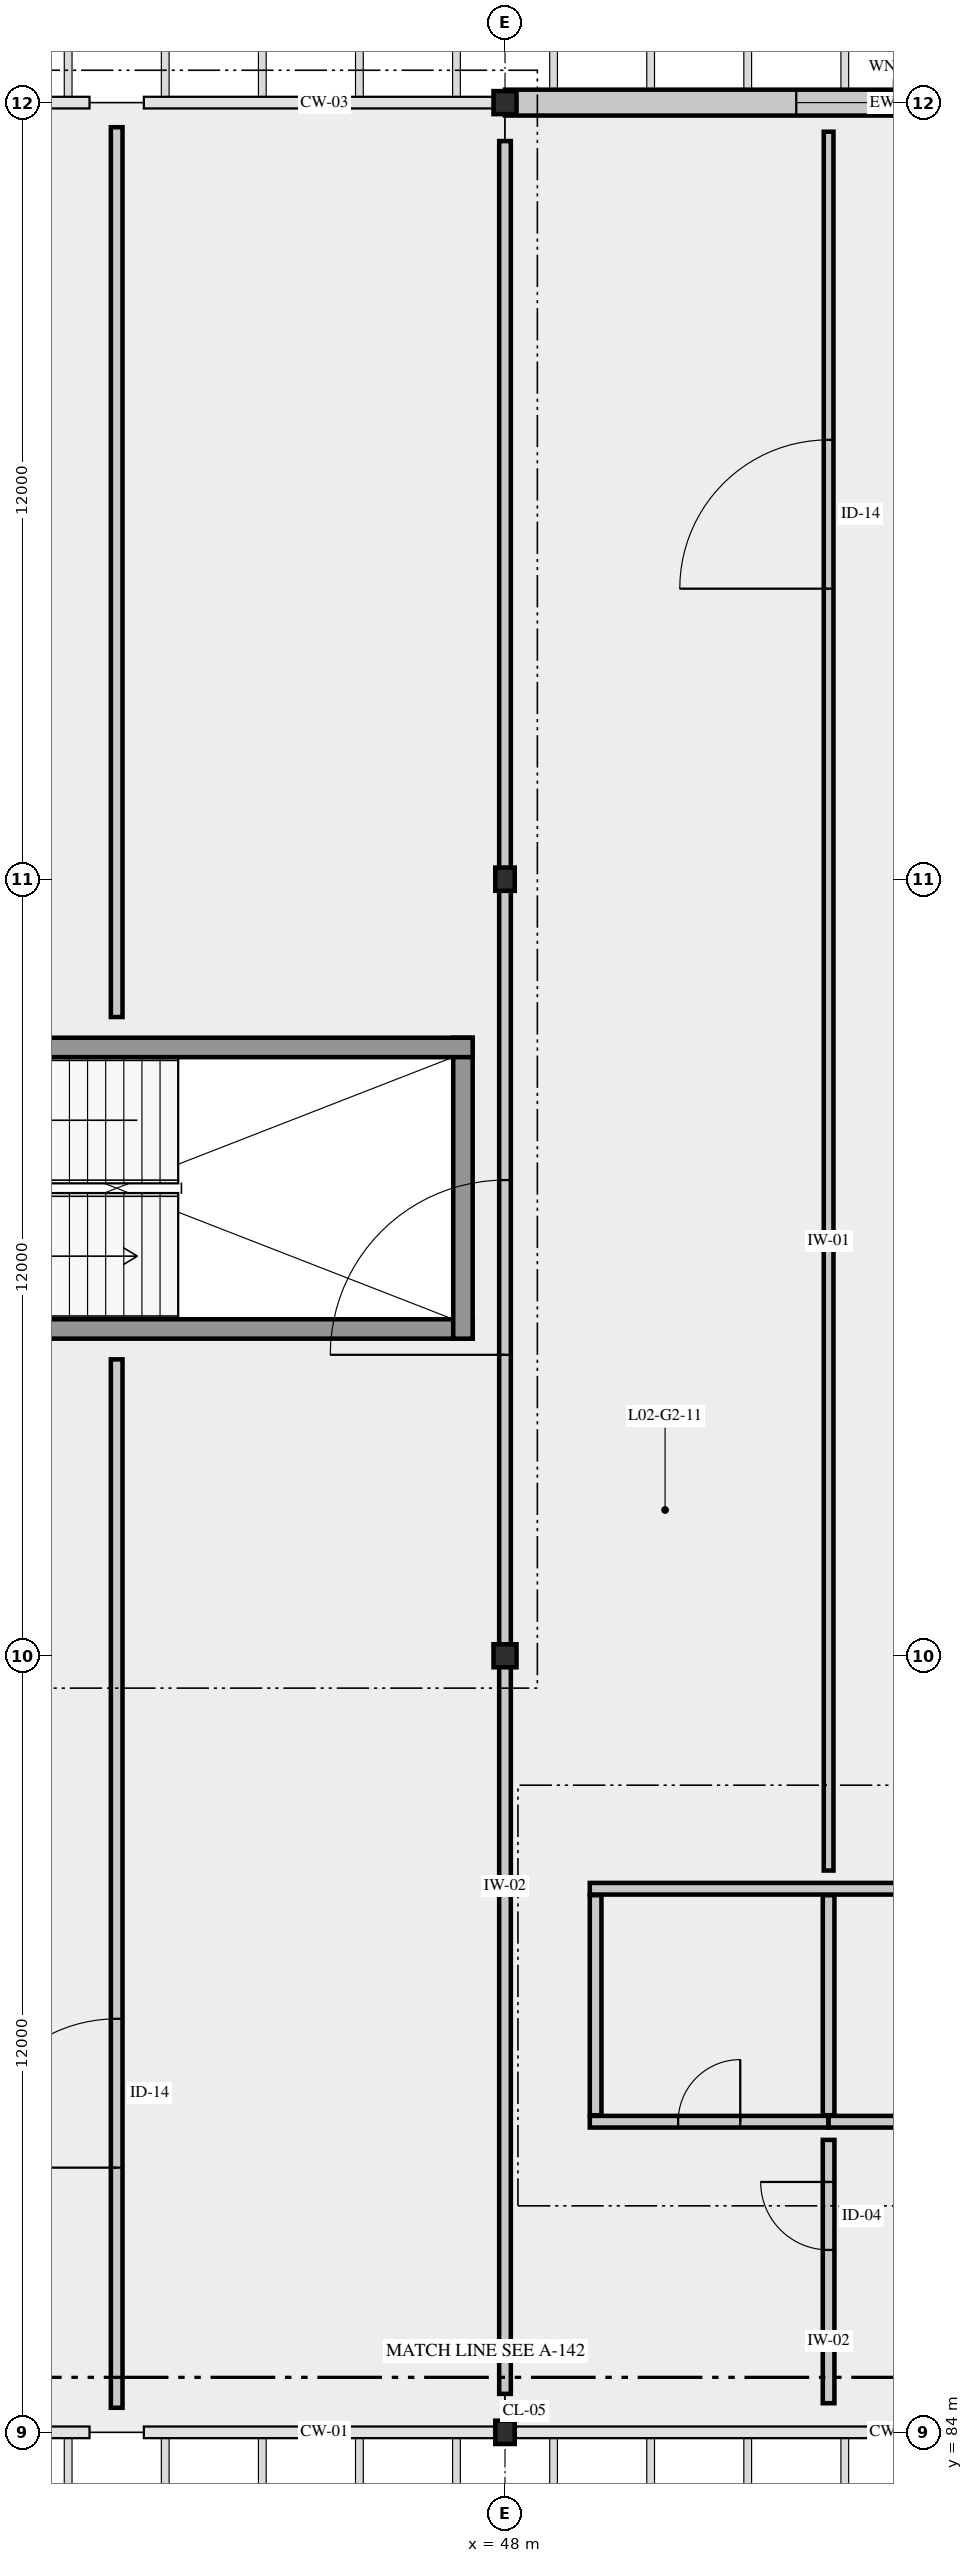
"""IFC4 building model, lengths in metres.
Left out: names, types, materials, properties, quantities, classifications, styles, units other than length and angle.
Written with IfcOpenShell. Run it as: python <this file> out.ifc"""

import sys

from ifc_helpers import new_model, si_unit, direction, frame, frame_2d, origin, origin_2d, place, context, subcontext, project, spatial, rectangle, hollow_circle, i_section, extrude, element, fill, save


model = new_model("IFC4")
c1 = context("Model", 3, precision=1e-05, world=origin(), true_north=direction((0.0, 1.0)))
c2 = subcontext(c1, "Body", "Model", "MODEL_VIEW")
j1 = project(units=[si_unit("LENGTHUNIT", "METRE"), si_unit("PLANEANGLEUNIT", "RADIAN")], contexts=[c1])
p1 = place(None, origin())
s1 = spatial("IfcSite", under=j1, at=p1, CompositionType="ELEMENT")
p2 = place(p1, origin())
s2 = spatial("IfcBuilding", under=s1, at=p2, CompositionType="ELEMENT")
p3 = place(p2, frame((0.0, 0.0, 10.8)))
s3 = spatial("IfcBuildingStorey", under=s2, at=p3, CompositionType="ELEMENT", Elevation=10.8)
p4 = place(p3, frame((48.0, 84.0, 0.0), z_axis=(0.0, 0.0, 1.0), x_axis=(1.0, 0.0, 0.0)))
e1 = element("IfcColumn", 1, at=p4, inside=s3, PredefinedType="COLUMN", context=c2, shape_type="SweptSolid", body=[
    extrude(i_section(OverallWidth=0.3, OverallDepth=0.36, WebThickness=0.012, FlangeThickness=0.022, FilletRadius=0.027, at=origin_2d()), origin(), (0.0, 0.0, 1.0), 6.0),
])
p5 = place(p3, frame((48.0, 96.0, 0.0), z_axis=(0.0, 0.0, 1.0), x_axis=(1.0, 0.0, 0.0)))
e2 = element("IfcColumn", 2, at=p5, inside=s3, PredefinedType="COLUMN", context=c2, shape_type="SweptSolid", body=[
    extrude(hollow_circle(Radius=0.178, WallThickness=0.016, at=origin_2d()), origin(), (0.0, 0.0, 1.0), 6.0),
])
p6 = place(p3, frame((48.0, 108.0, 0.0), z_axis=(0.0, 0.0, 1.0), x_axis=(1.0, 0.0, 0.0)))
e3 = element("IfcColumn", 3, at=p6, inside=s3, PredefinedType="COLUMN", context=c2, shape_type="SweptSolid", body=[
    extrude(i_section(OverallWidth=0.3, OverallDepth=0.36, WebThickness=0.012, FlangeThickness=0.022, FilletRadius=0.027, at=origin_2d()), origin(), (0.0, 0.0, 1.0), 6.0),
])
p7 = place(p3, frame((48.0, 120.0, 0.0), z_axis=(0.0, 0.0, 1.0), x_axis=(1.0, 0.0, 0.0)))
e4 = element("IfcColumn", 4, at=p7, inside=s3, PredefinedType="COLUMN", context=c2, shape_type="SweptSolid", body=[
    extrude(hollow_circle(Radius=0.178, WallThickness=0.016, at=origin_2d()), origin(), (0.0, 0.0, 1.0), 6.0),
])
p8 = place(p3, frame((60.0, 120.0, 0.0), z_axis=(0.0, 0.0, 1.0), x_axis=(-1.0, 0.0, 0.0)))
e5 = element("IfcWall", 5, at=p8, inside=s3, PredefinedType="SOLIDWALL", context=c2, shape_type="SweptSolid", body=[
    extrude(rectangle(XDim=12.0, YDim=0.4, at=frame_2d((6.0, 0.0))), origin(), (0.0, 0.0, 1.0), 5.11),
])
p9 = place(p8, frame((4.5, 0.0, 0.95)))
e6 = element("IfcOpeningElement", 6, at=p9, cuts=e5, PredefinedType="OPENING", context=c2, shape_type="SweptSolid", body=[
    extrude(rectangle(XDim=3.0, YDim=2.4, at=frame_2d((1.5, 1.2))), frame((0.0, 0.21, 0.0), z_axis=(0.0, -1.0, 0.0), x_axis=(1.0, 0.0, 0.0)), (0.0, 0.0, 1.0), 0.42),
])
p10 = place(p3, frame((36.5, 101.05, 0.0), z_axis=(0.0, 0.0, 1.0), x_axis=(1.0, 0.0, 0.0)))
e7 = element("IfcWall", 7, at=p10, inside=s3, PredefinedType="SHEAR", context=c2, shape_type="SweptSolid", body=[
    extrude(rectangle(XDim=11.0, YDim=0.3, at=frame_2d((5.5, 0.0))), origin(), (0.0, 0.0, 1.0), 5.69),
])
p11 = place(p10, frame((0.55, 0.0, 0.0)))
e8 = element("IfcOpeningElement", 8, at=p11, cuts=e7, PredefinedType="OPENING", context=c2, shape_type="SweptSolid", body=[
    extrude(rectangle(XDim=1.24, YDim=2.25, at=frame_2d((0.62, 1.125))), frame((0.0, 0.16, 0.0), z_axis=(0.0, -1.0, 0.0), x_axis=(1.0, 0.0, 0.0)), (0.0, 0.0, 1.0), 0.32),
])
p12 = place(p3, frame((47.35, 100.9, 0.0), z_axis=(0.0, 0.0, 1.0), x_axis=(0.0, 1.0, 0.0)))
e9 = element("IfcWall", 9, at=p12, inside=s3, PredefinedType="SHEAR", context=c2, shape_type="SweptSolid", body=[
    extrude(rectangle(XDim=4.65, YDim=0.3, at=frame_2d((2.325, 0.0))), origin(), (0.0, 0.0, 1.0), 5.69),
])
p13 = place(p3, frame((47.5, 105.4, 0.0), z_axis=(0.0, 0.0, 1.0), x_axis=(-1.0, 0.0, 0.0)))
e10 = element("IfcWall", 10, at=p13, inside=s3, PredefinedType="SHEAR", context=c2, shape_type="SweptSolid", body=[
    extrude(rectangle(XDim=11.0, YDim=0.3, at=frame_2d((5.5, 0.0))), origin(), (0.0, 0.0, 1.0), 5.69),
])
p14 = place(p3, frame((49.31, 92.4, 0.0), z_axis=(0.0, 0.0, 1.0), x_axis=(1.0, 0.0, 0.0)))
e11 = element("IfcWall", 11, at=p14, inside=s3, PredefinedType="PARTITIONING", context=c2, shape_type="SweptSolid", body=[
    extrude(rectangle(XDim=7.38, YDim=0.18, at=frame_2d((3.69, 0.0))), origin(), (0.0, 0.0, 1.0), 5.27),
])
p15 = place(p3, frame((49.31, 88.8, 0.0), z_axis=(0.0, 0.0, 1.0), x_axis=(1.0, 0.0, 0.0)))
e12 = element("IfcWall", 12, at=p15, inside=s3, PredefinedType="PARTITIONING", context=c2, shape_type="SweptSolid", body=[
    extrude(rectangle(XDim=3.69, YDim=0.18, at=frame_2d((1.845, 0.0))), origin(), (0.0, 0.0, 1.0), 5.27),
])
p16 = place(p15, frame((1.365, 0.0, 0.0)))
e13 = element("IfcOpeningElement", 13, at=p16, cuts=e12, PredefinedType="OPENING", context=c2, shape_type="SweptSolid", body=[
    extrude(rectangle(XDim=0.96, YDim=2.15, at=frame_2d((0.48, 1.075))), frame((0.0, 0.1, 0.0), z_axis=(0.0, -1.0, 0.0), x_axis=(1.0, 0.0, 0.0)), (0.0, 0.0, 1.0), 0.2),
])
p17 = place(p3, frame((53.0, 88.8, 0.0), z_axis=(0.0, 0.0, 1.0), x_axis=(1.0, 0.0, 0.0)))
e14 = element("IfcWall", 14, at=p17, inside=s3, PredefinedType="PARTITIONING", context=c2, shape_type="SweptSolid", body=[
    extrude(rectangle(XDim=3.69, YDim=0.18, at=frame_2d((1.845, 0.0))), origin(), (0.0, 0.0, 1.0), 5.27),
])
p18 = place(p17, frame((1.32, 0.0, 0.0)))
e15 = element("IfcOpeningElement", 15, at=p18, cuts=e14, PredefinedType="OPENING", context=c2, shape_type="SweptSolid", body=[
    extrude(rectangle(XDim=1.05, YDim=2.2, at=frame_2d((0.525, 1.1))), frame((0.0, 0.1, 0.0), z_axis=(0.0, -1.0, 0.0), x_axis=(1.0, 0.0, 0.0)), (0.0, 0.0, 1.0), 0.2),
])
for number, where, z_axis, x_axis in (
    (16, (49.4, 88.9, 0.0), (0.0, 0.0, 1.0), (0.0, 1.0, 0.0)),
    (17, (53.0, 88.9, 0.0), (0.0, 0.0, 1.0), (0.0, 1.0, 0.0)),
):
    element("IfcWall", number, at=place(p3, frame(where, z_axis=z_axis, x_axis=x_axis)), inside=s3, PredefinedType="PARTITIONING", context=c2, shape_type="SweptSolid", body=[
        extrude(rectangle(XDim=3.4, YDim=0.18, at=frame_2d((1.7, 0.0))), origin(), (0.0, 0.0, 1.0), 5.27),
    ])
p19 = place(p3, frame((42.0, 84.38, 0.0), z_axis=(0.0, 0.0, 1.0), x_axis=(0.0, 1.0, 0.0)))
e18 = element("IfcWall", 18, at=p19, inside=s3, PredefinedType="PARTITIONING", context=c2, shape_type="SweptSolid", body=[
    extrude(rectangle(XDim=16.2, YDim=0.18, at=frame_2d((8.1, 0.0))), origin(), (0.0, 0.0, 1.0), 5.18),
])
p20 = place(p19, frame((3.71, 0.0, 0.0)))
e19 = element("IfcOpeningElement", 19, at=p20, cuts=e18, PredefinedType="OPENING", context=c2, shape_type="SweptSolid", body=[
    extrude(rectangle(XDim=2.3, YDim=2.6, at=frame_2d((1.15, 1.3))), frame((0.0, 0.1, 0.0), z_axis=(0.0, -1.0, 0.0), x_axis=(1.0, 0.0, 0.0)), (0.0, 0.0, 1.0), 0.2),
])
p21 = place(p3, frame((42.0, 105.87, 0.0), z_axis=(0.0, 0.0, 1.0), x_axis=(0.0, 1.0, 0.0)))
e20 = element("IfcWall", 20, at=p21, inside=s3, PredefinedType="PARTITIONING", context=c2, shape_type="SweptSolid", body=[
    extrude(rectangle(XDim=13.75, YDim=0.18, at=frame_2d((6.875, 0.0))), origin(), (0.0, 0.0, 1.0), 5.18),
])
p22 = place(p3, frame((48.0, 84.594, 0.0), z_axis=(0.0, 0.0, 1.0), x_axis=(0.0, 1.0, 0.0)))
e21 = element("IfcWall", 21, at=p22, inside=s3, PredefinedType="PARTITIONING", context=c2, shape_type="SweptSolid", body=[
    extrude(rectangle(XDim=34.811, YDim=0.18, at=frame_2d((17.406, 0.0))), origin(), (0.0, 0.0, 1.0), 5.18),
])
p23 = place(p22, frame((16.056, 0.0, 0.0)))
e22 = element("IfcOpeningElement", 22, at=p23, cuts=e21, PredefinedType="OPENING", context=c2, shape_type="SweptSolid", body=[
    extrude(rectangle(XDim=2.7, YDim=2.85, at=frame_2d((1.35, 1.425))), frame((0.0, 0.1, 0.0), z_axis=(0.0, -1.0, 0.0), x_axis=(1.0, 0.0, 0.0)), (0.0, 0.0, 1.0), 0.2),
])
p24 = place(p3, frame((53.0, 84.45, 0.0), z_axis=(0.0, 0.0, 1.0), x_axis=(0.0, 1.0, 0.0)))
e23 = element("IfcWall", 23, at=p24, inside=s3, PredefinedType="PARTITIONING", context=c2, shape_type="SweptSolid", body=[
    extrude(rectangle(XDim=4.069, YDim=0.18, at=frame_2d((2.035, 0.0))), origin(), (0.0, 0.0, 1.0), 5.27),
])
p25 = place(p24, frame((2.369, 0.0, 0.0)))
e24 = element("IfcOpeningElement", 24, at=p25, cuts=e23, PredefinedType="OPENING", context=c2, shape_type="SweptSolid", body=[
    extrude(rectangle(XDim=1.05, YDim=2.2, at=frame_2d((0.525, 1.1))), frame((0.0, 0.1, 0.0), z_axis=(0.0, -1.0, 0.0), x_axis=(1.0, 0.0, 0.0)), (0.0, 0.0, 1.0), 0.2),
])
p26 = place(p3, frame((53.0, 92.681, 0.0), z_axis=(0.0, 0.0, 1.0), x_axis=(0.0, 1.0, 0.0)))
e25 = element("IfcWall", 25, at=p26, inside=s3, PredefinedType="PARTITIONING", context=c2, shape_type="SweptSolid", body=[
    extrude(rectangle(XDim=26.869, YDim=0.15, at=frame_2d((13.435, 0.0))), origin(), (0.0, 0.0, 1.0), 5.18),
])
p27 = place(p26, frame((19.808, 0.0, 0.0)))
e26 = element("IfcOpeningElement", 26, at=p27, cuts=e25, PredefinedType="OPENING", context=c2, shape_type="SweptSolid", body=[
    extrude(rectangle(XDim=2.3, YDim=2.6, at=frame_2d((1.15, 1.3))), frame((0.0, 0.085, 0.0), z_axis=(0.0, -1.0, 0.0), x_axis=(1.0, 0.0, 0.0)), (0.0, 0.0, 1.0), 0.17),
])
p28 = place(p9, origin())
e27 = element("IfcWindow", 27, at=p28, inside=s3, PartitioningType="SINGLE_PANEL", PredefinedType="WINDOW", context=c2, shape_type="SweptSolid", body=[
    extrude(rectangle(XDim=3.0, YDim=2.4, at=frame_2d((1.5, 1.2))), frame((0.0, 0.03, 0.0), z_axis=(0.0, -1.0, 0.0), x_axis=(1.0, 0.0, 0.0)), (0.0, 0.0, 1.0), 0.06),
])
fill(e6, e27)
p29 = place(p16, origin())
e28 = element("IfcDoor", 28, at=p29, inside=s3, OperationType="SINGLE_SWING_RIGHT", PredefinedType="DOOR", context=c2, shape_type="SweptSolid", body=[
    extrude(rectangle(XDim=0.96, YDim=2.15, at=frame_2d((0.48, 1.075))), frame((0.0, 0.025, 0.0), z_axis=(0.0, -1.0, 0.0), x_axis=(1.0, 0.0, 0.0)), (0.0, 0.0, 1.0), 0.05),
])
fill(e13, e28)
p30 = place(p20, origin())
e29 = element("IfcDoor", 29, at=p30, inside=s3, OperationType="DOUBLE_DOOR_SINGLE_SWING", PredefinedType="DOOR", context=c2, shape_type="SweptSolid", body=[
    extrude(rectangle(XDim=2.3, YDim=2.6, at=frame_2d((1.15, 1.3))), frame((0.0, 0.025, 0.0), z_axis=(0.0, -1.0, 0.0), x_axis=(1.0, 0.0, 0.0)), (0.0, 0.0, 1.0), 0.05),
])
fill(e19, e29)
p31 = place(p23, origin())
e30 = element("IfcDoor", 30, at=p31, inside=s3, OperationType="DOUBLE_DOOR_SINGLE_SWING", PredefinedType="DOOR", context=c2, shape_type="SweptSolid", body=[
    extrude(rectangle(XDim=2.7, YDim=2.85, at=frame_2d((1.35, 1.425))), frame((0.0, 0.025, 0.0), z_axis=(0.0, -1.0, 0.0), x_axis=(1.0, 0.0, 0.0)), (0.0, 0.0, 1.0), 0.05),
])
fill(e22, e30)
p32 = place(p25, origin())
e31 = element("IfcDoor", 31, at=p32, inside=s3, OperationType="SINGLE_SWING_RIGHT", PredefinedType="DOOR", context=c2, shape_type="SweptSolid", body=[
    extrude(rectangle(XDim=1.05, YDim=2.2, at=frame_2d((0.525, 1.1))), frame((0.0, 0.025, 0.0), z_axis=(0.0, -1.0, 0.0), x_axis=(1.0, 0.0, 0.0)), (0.0, 0.0, 1.0), 0.05),
])
fill(e24, e31)
p33 = place(p27, origin())
e32 = element("IfcDoor", 32, at=p33, inside=s3, OperationType="DOUBLE_DOOR_SINGLE_SWING", PredefinedType="DOOR", context=c2, shape_type="SweptSolid", body=[
    extrude(rectangle(XDim=2.3, YDim=2.6, at=frame_2d((1.15, 1.3))), frame((0.0, 0.025, 0.0), z_axis=(0.0, -1.0, 0.0), x_axis=(1.0, 0.0, 0.0)), (0.0, 0.0, 1.0), 0.05),
])
fill(e26, e32)
save(model, sys.argv[1])
